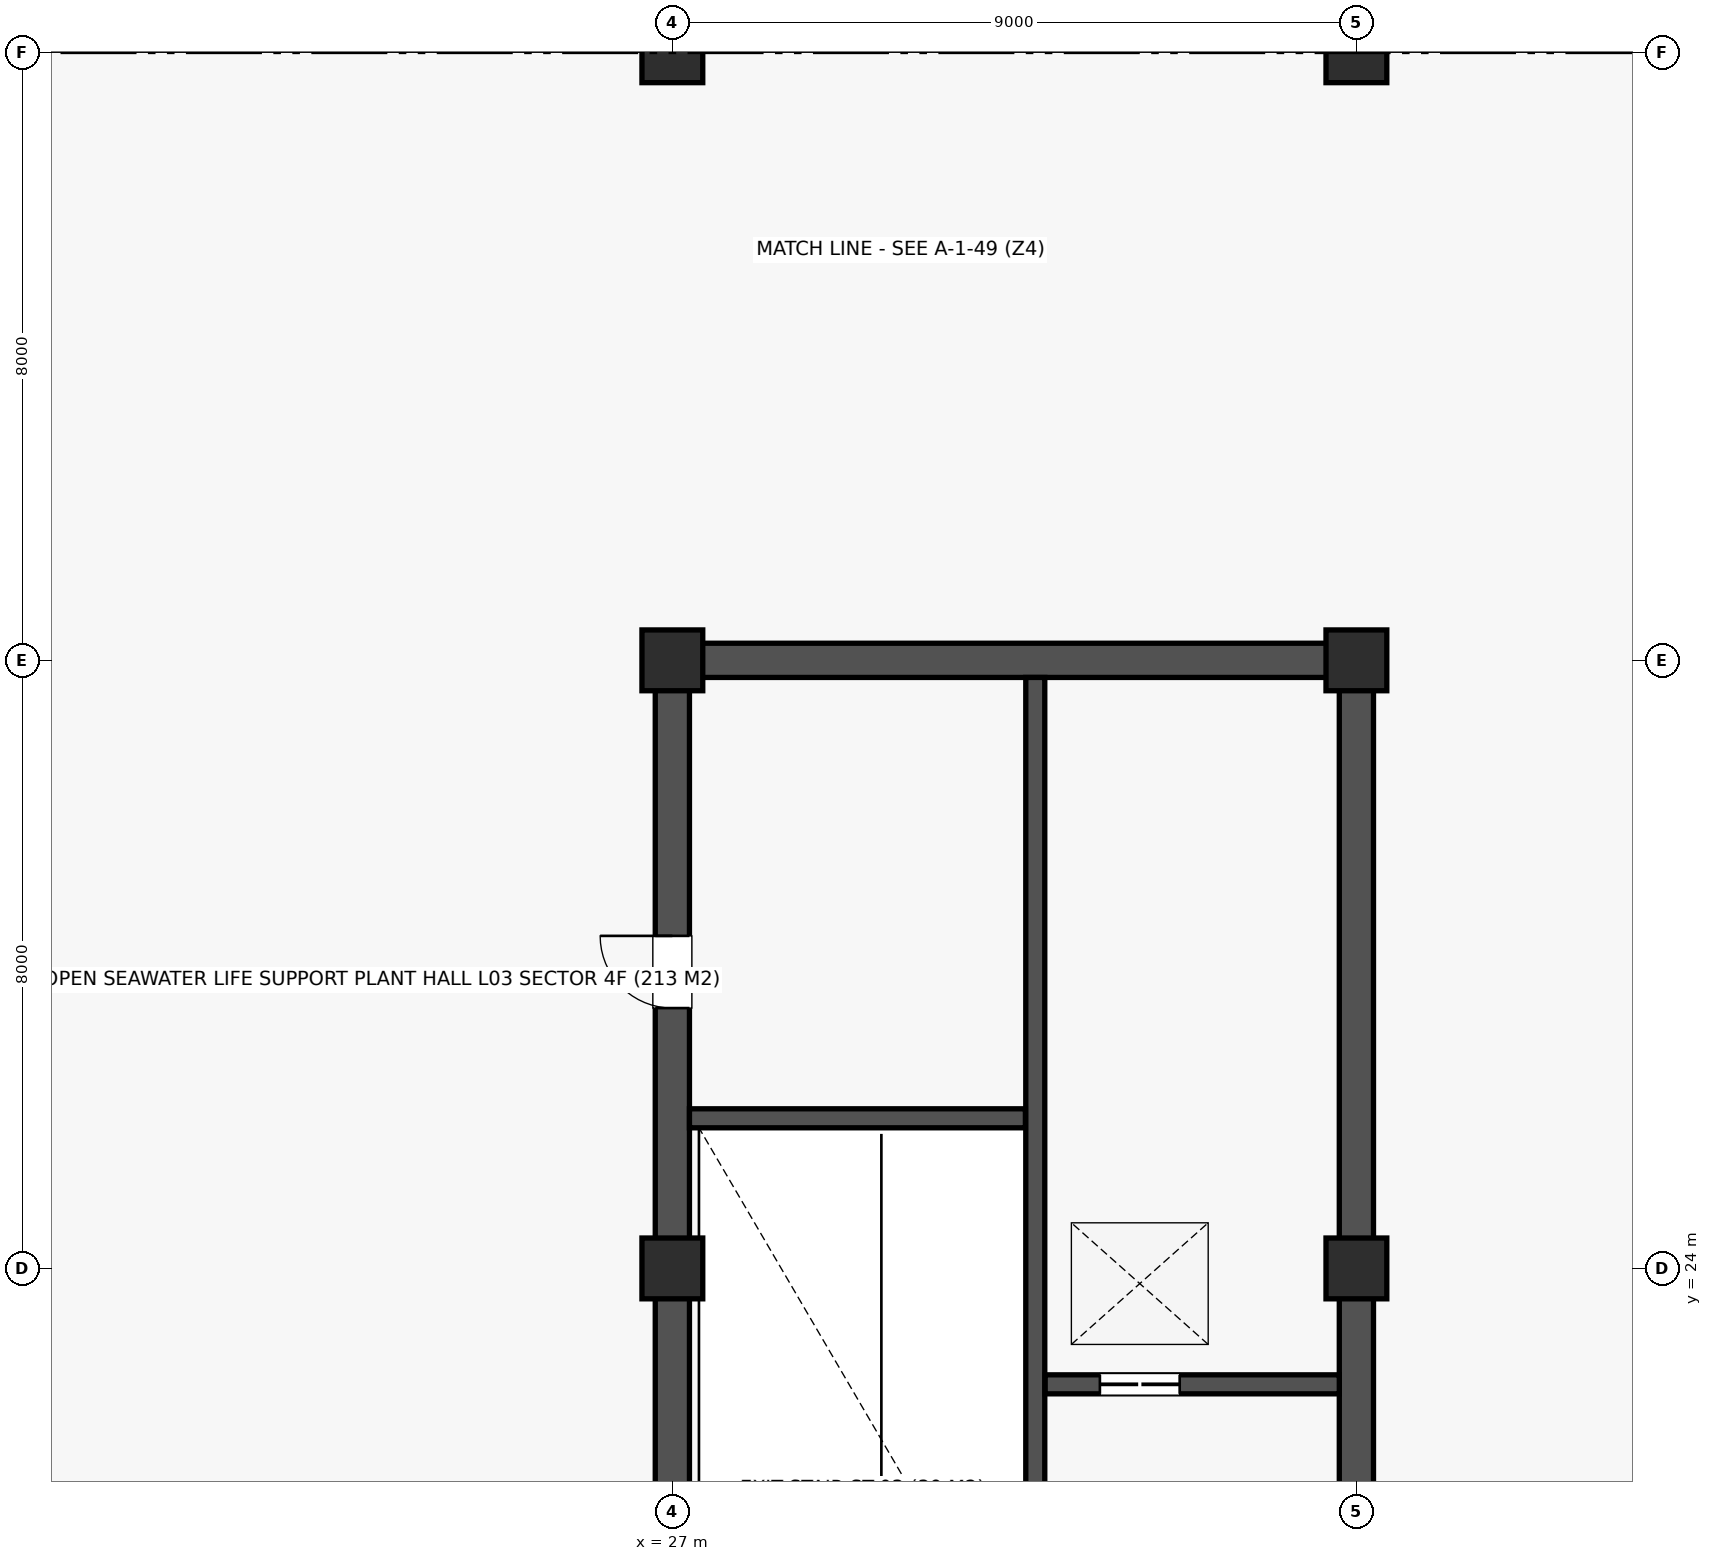
"""IFC4 building model, lengths in metres.
Left out: names, types, materials, properties, quantities, classifications, styles, units other than length and angle.
Written with IfcOpenShell. Run it as: python <this file> out.ifc"""

import sys

from ifc_helpers import new_model, si_unit, direction, frame, frame_2d, origin, origin_2d, place, context, subcontext, project, spatial, rectangle, extrude, element, fill, save


model = new_model("IFC4")
c1 = context("Model", 3, precision=1e-05, world=origin(), true_north=direction((0.0, 1.0)))
c2 = subcontext(c1, "Body", "Model", "MODEL_VIEW")
j1 = project(units=[si_unit("LENGTHUNIT", "METRE"), si_unit("PLANEANGLEUNIT", "RADIAN")], contexts=[c1])
p1 = place(None, origin())
s1 = spatial("IfcSite", under=j1, at=p1, CompositionType="ELEMENT")
p2 = place(p1, origin())
s2 = spatial("IfcBuilding", under=s1, at=p2, CompositionType="ELEMENT")
p3 = place(p2, frame((0.0, 0.0, 13.5)))
s3 = spatial("IfcBuildingStorey", under=s2, at=p3, CompositionType="ELEMENT", Elevation=13.5)
for number, where, z_axis, x_axis in (
    (1, (27.0, 24.0, 0.0), (0.0, 0.0, 1.0), (1.0, 0.0, 0.0)),
    (2, (27.0, 32.0, 0.0), (0.0, 0.0, 1.0), (1.0, 0.0, 0.0)),
    (3, (27.0, 40.0, 0.0), (0.0, 0.0, 1.0), (1.0, 0.0, 0.0)),
    (4, (36.0, 24.0, 0.0), (0.0, 0.0, 1.0), (1.0, 0.0, 0.0)),
    (5, (36.0, 32.0, 0.0), (0.0, 0.0, 1.0), (1.0, 0.0, 0.0)),
    (6, (36.0, 40.0, 0.0), (0.0, 0.0, 1.0), (1.0, 0.0, 0.0)),
):
    element("IfcColumn", number, at=place(p3, frame(where, z_axis=z_axis, x_axis=x_axis)), inside=s3, PredefinedType="COLUMN", context=c2, shape_type="SweptSolid", body=[
        extrude(rectangle(XDim=0.8, YDim=0.8, at=origin_2d()), origin(), (0.0, 0.0, 1.0), 4.2),
    ])
p4 = place(p3, frame((27.225, 32.0, 0.0), z_axis=(0.0, 0.0, 1.0), x_axis=(1.0, 0.0, 0.0)))
e7 = element("IfcWall", 7, at=p4, inside=s3, PredefinedType="SHEAR", context=c2, shape_type="SweptSolid", body=[
    extrude(rectangle(XDim=8.55, YDim=0.45, at=frame_2d((4.275, 0.0))), origin(), (0.0, 0.0, 1.0), 4.2),
])
p5 = place(p3, frame((27.0, 16.225, 0.0), z_axis=(0.0, 0.0, 1.0), x_axis=(0.0, 1.0, 0.0)))
e8 = element("IfcWall", 8, at=p5, inside=s3, PredefinedType="SHEAR", context=c2, shape_type="SweptSolid", body=[
    extrude(rectangle(XDim=15.55, YDim=0.45, at=frame_2d((7.775, 0.0))), origin(), (0.0, 0.0, 1.0), 4.2),
])
p6 = place(p5, frame((11.2, 0.0, 0.0)))
e9 = element("IfcOpeningElement", 9, at=p6, cuts=e8, PredefinedType="OPENING", context=c2, shape_type="SweptSolid", body=[
    extrude(rectangle(XDim=0.95, YDim=2.1, at=frame_2d((0.475, 1.05))), frame((0.0, 0.237, 0.0), z_axis=(0.0, -1.0, 0.0), x_axis=(1.0, 0.0, 0.0)), (0.0, 0.0, 1.0), 0.474),
])
p7 = place(p3, frame((36.0, 16.225, 0.0), z_axis=(0.0, 0.0, 1.0), x_axis=(0.0, 1.0, 0.0)))
e10 = element("IfcWall", 10, at=p7, inside=s3, PredefinedType="SHEAR", context=c2, shape_type="SweptSolid", body=[
    extrude(rectangle(XDim=15.55, YDim=0.45, at=frame_2d((7.775, 0.0))), origin(), (0.0, 0.0, 1.0), 4.2),
])
p8 = place(p3, frame((31.775, 16.225, 0.0), z_axis=(0.0, 0.0, 1.0), x_axis=(0.0, 1.0, 0.0)))
e11 = element("IfcWall", 11, at=p8, inside=s3, PredefinedType="SOLIDWALL", context=c2, shape_type="SweptSolid", body=[
    extrude(rectangle(XDim=15.55, YDim=0.25, at=frame_2d((7.775, 0.0))), origin(), (0.0, 0.0, 1.0), 4.2),
])
p9 = place(p8, frame((0.45, 0.0, 0.0)))
e12 = element("IfcOpeningElement", 12, at=p9, cuts=e11, PredefinedType="OPENING", context=c2, shape_type="SweptSolid", body=[
    extrude(rectangle(XDim=1.1, YDim=2.15, at=frame_2d((0.55, 1.075))), frame((0.0, 0.137, 0.0), z_axis=(0.0, -1.0, 0.0), x_axis=(1.0, 0.0, 0.0)), (0.0, 0.0, 1.0), 0.274),
])
p10 = place(p3, frame((27.225, 25.975, 0.0), z_axis=(0.0, 0.0, 1.0), x_axis=(1.0, 0.0, 0.0)))
e13 = element("IfcWall", 13, at=p10, inside=s3, PredefinedType="SOLIDWALL", context=c2, shape_type="SweptSolid", body=[
    extrude(rectangle(XDim=4.42, YDim=0.25, at=frame_2d((2.21, 0.0))), origin(), (0.0, 0.0, 1.0), 4.2),
])
p11 = place(p3, frame((31.905, 22.475, 0.0), z_axis=(0.0, 0.0, 1.0), x_axis=(1.0, 0.0, 0.0)))
e14 = element("IfcWall", 14, at=p11, inside=s3, PredefinedType="SOLIDWALL", context=c2, shape_type="SweptSolid", body=[
    extrude(rectangle(XDim=3.87, YDim=0.25, at=frame_2d((1.935, 0.0))), origin(), (0.0, 0.0, 1.0), 4.2),
])
p12 = place(p11, frame((0.72, 0.0, 0.0)))
e15 = element("IfcOpeningElement", 15, at=p12, cuts=e14, PredefinedType="OPENING", context=c2, shape_type="SweptSolid", body=[
    extrude(rectangle(XDim=1.05, YDim=2.12, at=frame_2d((0.525, 1.06))), frame((0.0, 0.137, 0.0), z_axis=(0.0, -1.0, 0.0), x_axis=(1.0, 0.0, 0.0)), (0.0, 0.0, 1.0), 0.274),
])
p13 = place(p6, origin())
e16 = element("IfcDoor", 16, at=p13, inside=s3, OperationType="SINGLE_SWING_RIGHT", PredefinedType="DOOR", context=c2, shape_type="SweptSolid", body=[
    extrude(rectangle(XDim=0.95, YDim=2.1, at=frame_2d((0.475, 1.05))), frame((0.0, 0.025, 0.0), z_axis=(0.0, -1.0, 0.0), x_axis=(1.0, 0.0, 0.0)), (0.0, 0.0, 1.0), 0.05),
])
fill(e9, e16)
p14 = place(p12, origin())
e17 = element("IfcDoor", 17, at=p14, inside=s3, OperationType="DOUBLE_DOOR_SLIDING", PredefinedType="DOOR", context=c2, shape_type="SweptSolid", body=[
    extrude(rectangle(XDim=1.05, YDim=2.12, at=frame_2d((0.525, 1.06))), frame((0.0, 0.025, 0.0), z_axis=(0.0, -1.0, 0.0), x_axis=(1.0, 0.0, 0.0)), (0.0, 0.0, 1.0), 0.05),
])
fill(e15, e17)
save(model, sys.argv[1])
